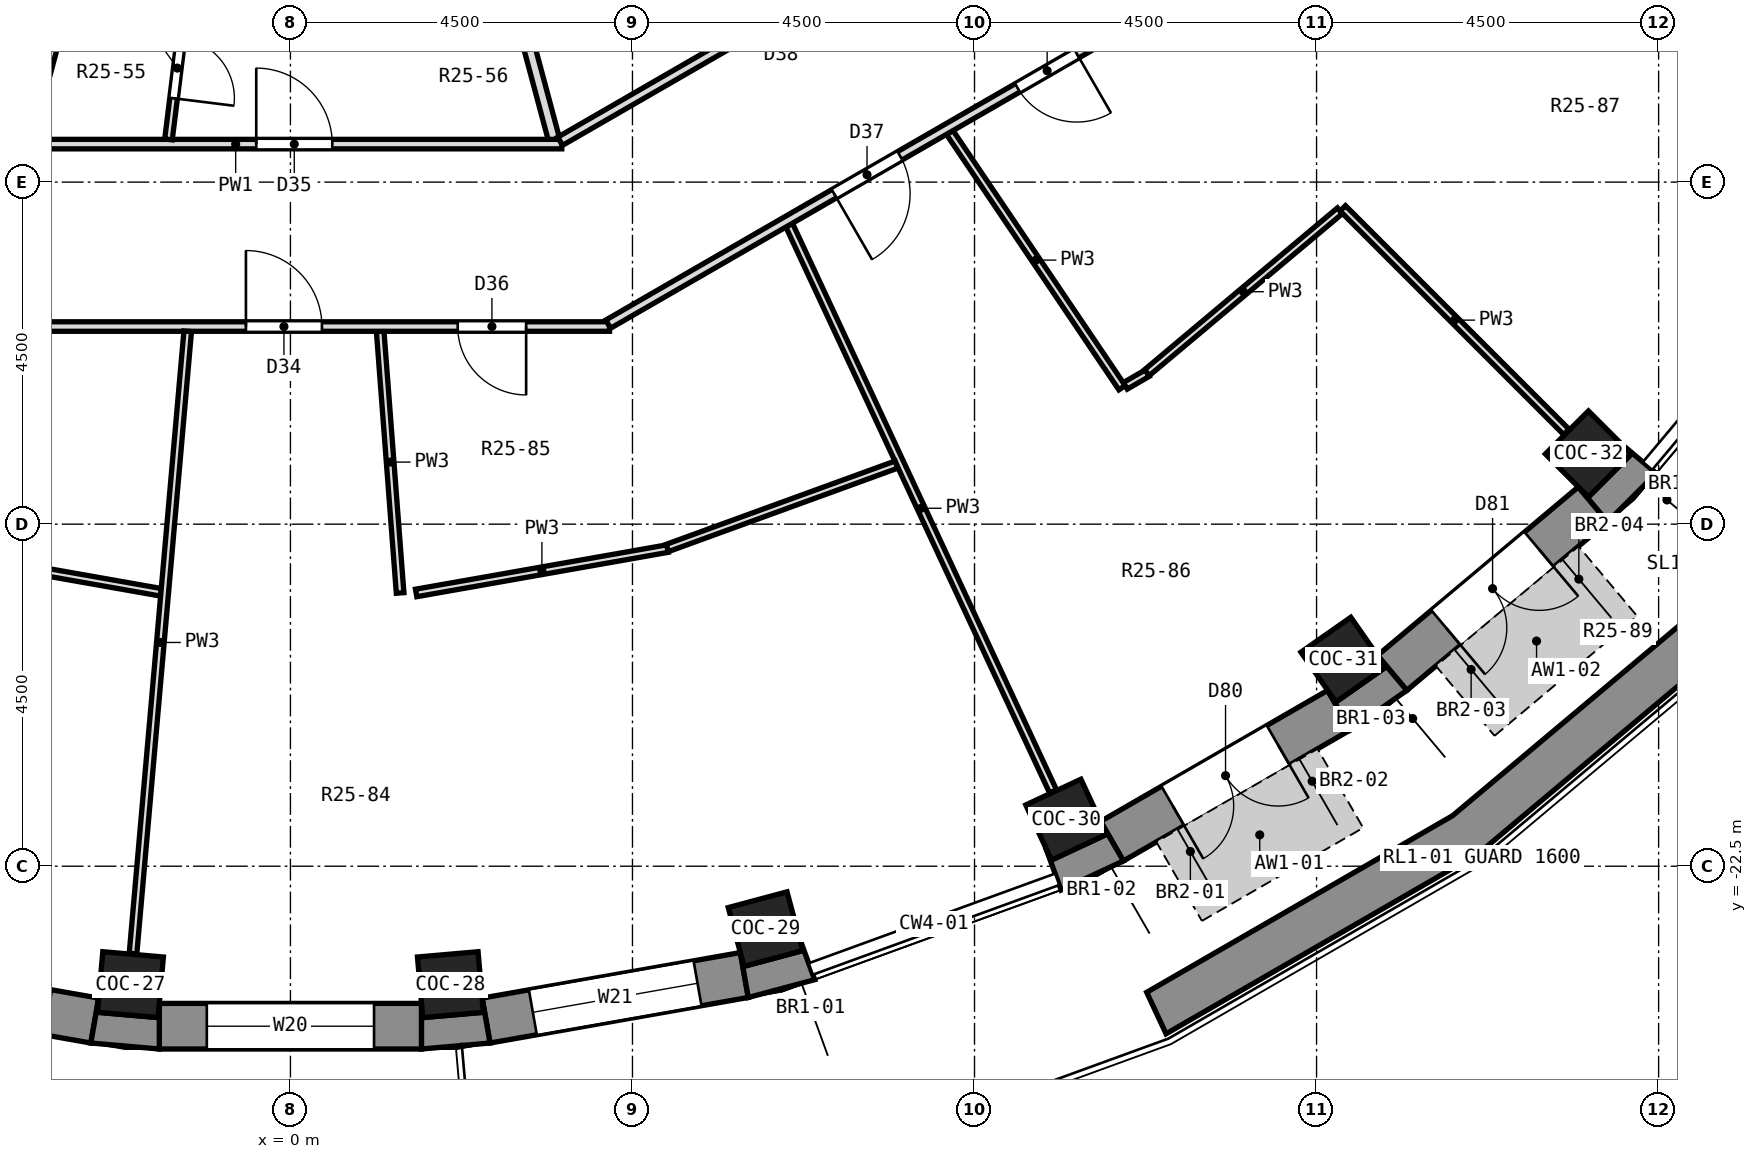
"""IFC4 building model, lengths in metres.
Left out: names, types, materials, properties, quantities, classifications, styles, units other than length and angle.
Written with IfcOpenShell. Run it as: python <this file> out.ifc"""

import sys

from ifc_helpers import new_model, si_unit, direction, frame, frame_2d, origin, origin_2d, place, context, subcontext, project, spatial, polyline, rectangle, outline, extrude, element, fill, save


model = new_model("IFC4")
c1 = context("Model", 3, precision=1e-05, world=origin(), true_north=direction((0.0, 1.0)))
c2 = subcontext(c1, "Body", "Model", "MODEL_VIEW")
j1 = project(units=[si_unit("LENGTHUNIT", "METRE"), si_unit("PLANEANGLEUNIT", "RADIAN")], contexts=[c1])
p1 = place(None, origin())
s1 = spatial("IfcSite", under=j1, at=p1, CompositionType="ELEMENT")
p2 = place(p1, origin())
s2 = spatial("IfcBuilding", under=s1, at=p2, CompositionType="ELEMENT")
p3 = place(p2, frame((0.0, 0.0, 160.8)))
s3 = spatial("IfcBuildingStorey", under=s2, at=p3, CompositionType="ELEMENT", Elevation=160.8)
for number, where, z_axis, x_axis in (
    (1, (-2.105, -24.058, 0.0), (0.0, 0.0, 1.0), (-0.087, -0.996, 0.0)),
    (2, (2.105, -24.058, 0.0), (0.0, 0.0, 1.0), (0.087, -0.996, 0.0)),
    (3, (6.25, -23.327, 0.0), (0.0, 0.0, 1.0), (0.259, -0.966, 0.0)),
    (4, (10.206, -21.887, 0.0), (0.0, 0.0, 1.0), (0.423, -0.906, 0.0)),
    (5, (13.852, -19.782, 0.0), (0.0, 0.0, 1.0), (0.574, -0.819, 0.0)),
    (6, (17.077, -17.077, 0.0), (0.0, 0.0, 1.0), (0.707, -0.707, 0.0)),
):
    element("IfcColumn", number, at=place(p3, frame(where, z_axis=z_axis, x_axis=x_axis)), inside=s3, PredefinedType="COLUMN", context=c2, shape_type="SweptSolid", body=[
        extrude(rectangle(XDim=0.8, YDim=0.8, at=origin_2d()), origin(), (0.0, 0.0, 1.0), 3.3),
    ])
p4 = place(p3, frame((-5.971, -23.932, 0.0), z_axis=(0.0, 0.0, 1.0), x_axis=(0.984814892183, -0.173607684551, 0.0)))
e7 = element("IfcWall", 7, at=p4, inside=s3, PredefinedType="SOLIDWALL", context=c2, shape_type="SweptSolid", body=[
    extrude(rectangle(XDim=3.45, YDim=0.6, at=frame_2d((1.725, 0.0))), origin(), (0.0, 0.0, 1.0), 2.85),
])
p5 = place(p4, frame((0.625, 0.0, 0.9)))
e8 = element("IfcOpeningElement", 8, at=p5, cuts=e7, PredefinedType="OPENING", context=c2, shape_type="SweptSolid", body=[
    extrude(rectangle(XDim=2.2, YDim=1.8, at=frame_2d((1.1, 0.9))), frame((0.0, 0.312, 0.0), z_axis=(0.0, -1.0, 0.0), x_axis=(1.0, 0.0, 0.0)), (0.0, 0.0, 1.0), 0.624),
])
p6 = place(p3, frame((-1.725, -24.605, 0.0), z_axis=(0.0, 0.0, 1.0), x_axis=(1.0, 0.0, 0.0)))
e9 = element("IfcWall", 9, at=p6, inside=s3, PredefinedType="SOLIDWALL", context=c2, shape_type="SweptSolid", body=[
    extrude(rectangle(XDim=3.45, YDim=0.6, at=frame_2d((1.725, 0.0))), origin(), (0.0, 0.0, 1.0), 2.85),
])
p7 = place(p6, frame((0.625, 0.0, 0.9)))
e10 = element("IfcOpeningElement", 10, at=p7, cuts=e9, PredefinedType="OPENING", context=c2, shape_type="SweptSolid", body=[
    extrude(rectangle(XDim=2.2, YDim=1.8, at=frame_2d((1.1, 0.9))), frame((0.0, 0.312, 0.0), z_axis=(0.0, -1.0, 0.0), x_axis=(1.0, 0.0, 0.0)), (0.0, 0.0, 1.0), 0.624),
])
p8 = place(p3, frame((2.574, -24.531, 0.0), z_axis=(0.0, 0.0, 1.0), x_axis=(0.984814892183, 0.173607684551, 0.0)))
e11 = element("IfcWall", 11, at=p8, inside=s3, PredefinedType="SOLIDWALL", context=c2, shape_type="SweptSolid", body=[
    extrude(rectangle(XDim=3.45, YDim=0.6, at=frame_2d((1.725, 0.0))), origin(), (0.0, 0.0, 1.0), 2.85),
])
p9 = place(p8, frame((0.625, 0.0, 0.9)))
e12 = element("IfcOpeningElement", 12, at=p9, cuts=e11, PredefinedType="OPENING", context=c2, shape_type="SweptSolid", body=[
    extrude(rectangle(XDim=2.2, YDim=1.8, at=frame_2d((1.1, 0.9))), frame((0.0, 0.312, 0.0), z_axis=(0.0, -1.0, 0.0), x_axis=(1.0, 0.0, 0.0)), (0.0, 0.0, 1.0), 0.624),
])
p10 = place(p3, frame((10.809, -22.171, 0.0), z_axis=(0.0, 0.0, 1.0), x_axis=(0.86602648383, 0.499998129301, 0.0)))
e13 = element("IfcWall", 13, at=p10, inside=s3, PredefinedType="SOLIDWALL", context=c2, shape_type="SweptSolid", body=[
    extrude(rectangle(XDim=3.45, YDim=0.6, at=frame_2d((1.725, 0.0))), origin(), (0.0, 0.0, 1.0), 2.85),
])
p11 = place(p10, frame((0.925, 0.0, 0.0)))
e14 = element("IfcOpeningElement", 14, at=p11, cuts=e13, PredefinedType="OPENING", context=c2, shape_type="SweptSolid", body=[
    extrude(rectangle(XDim=1.6, YDim=2.4, at=frame_2d((0.8, 1.2))), frame((0.0, 0.312, 0.0), z_axis=(0.0, -1.0, 0.0), x_axis=(1.0, 0.0, 0.0)), (0.0, 0.0, 1.0), 0.624),
])
p12 = place(p3, frame((14.494, -19.957, 0.0), z_axis=(0.0, 0.0, 1.0), x_axis=(0.766058884809, 0.642770398358, 0.0)))
e15 = element("IfcWall", 15, at=p12, inside=s3, PredefinedType="SOLIDWALL", context=c2, shape_type="SweptSolid", body=[
    extrude(rectangle(XDim=3.449, YDim=0.6, at=frame_2d((1.725, 0.0))), origin(), (0.0, 0.0, 1.0), 2.85),
])
p13 = place(p12, frame((0.925, 0.0, 0.0)))
e16 = element("IfcOpeningElement", 16, at=p13, cuts=e15, PredefinedType="OPENING", context=c2, shape_type="SweptSolid", body=[
    extrude(rectangle(XDim=1.6, YDim=2.4, at=frame_2d((0.8, 1.2))), frame((0.0, 0.312, 0.0), z_axis=(0.0, -1.0, 0.0), x_axis=(1.0, 0.0, 0.0)), (0.0, 0.0, 1.0), 0.624),
])
p14 = place(p3, origin())
e17 = element("IfcWall", 17, at=p14, inside=s3, PredefinedType="SOLIDWALL", context=c2, shape_type="SweptSolid", body=[
    extrude(outline(polyline([(-2.626, -24.826), (-1.725, -24.905), (-1.725, -24.305), (-1.741, -24.491), (-2.538, -24.422), (-2.522, -24.235), (-2.626, -24.826)])), origin(), (0.0, 0.0, 1.0), 2.85),
])
p15 = place(p3, origin())
e18 = element("IfcWall", 18, at=p15, inside=s3, PredefinedType="SOLIDWALL", context=c2, shape_type="SweptSolid", body=[
    extrude(outline(polyline([(1.725, -24.905), (2.626, -24.826), (2.522, -24.235), (2.538, -24.422), (1.741, -24.491), (1.725, -24.305), (1.725, -24.905)])), origin(), (0.0, 0.0, 1.0), 2.85),
])
p16 = place(p3, origin())
e19 = element("IfcWall", 19, at=p16, inside=s3, PredefinedType="SOLIDWALL", context=c2, shape_type="SweptSolid", body=[
    extrude(outline(polyline([(6.023, -24.227), (6.897, -23.993), (6.692, -23.429), (6.74, -23.61), (5.968, -23.817), (5.919, -23.636), (6.023, -24.227)])), origin(), (0.0, 0.0, 1.0), 2.85),
])
p17 = place(p3, origin())
e20 = element("IfcWall", 20, at=p17, inside=s3, PredefinedType="SOLIDWALL", context=c2, shape_type="SweptSolid", body=[
    extrude(outline(polyline([(10.959, -22.431), (10.659, -21.911), (10.738, -22.081), (10.013, -22.419), (9.934, -22.249), (10.139, -22.813), (10.959, -22.431)])), origin(), (0.0, 0.0, 1.0), 2.85),
])
p18 = place(p3, origin())
e21 = element("IfcWall", 21, at=p18, inside=s3, PredefinedType="SOLIDWALL", context=c2, shape_type="SweptSolid", body=[
    extrude(outline(polyline([(13.946, -20.706), (14.687, -20.187), (14.302, -19.727), (14.409, -19.881), (13.754, -20.34), (13.646, -20.186), (13.946, -20.706)])), origin(), (0.0, 0.0, 1.0), 2.85),
])
p19 = place(p3, origin())
e22 = element("IfcWall", 22, at=p19, inside=s3, PredefinedType="SOLIDWALL", context=c2, shape_type="SweptSolid", body=[
    extrude(outline(polyline([(17.969, -17.33), (17.51, -16.944), (17.642, -17.077), (17.077, -17.642), (16.944, -17.51), (17.33, -17.969), (17.969, -17.33)])), origin(), (0.0, 0.0, 1.0), 2.85),
])
p20 = place(p3, origin())
e23 = element("IfcWall", 23, at=p20, inside=s3, PredefinedType="PARAPET", context=c2, shape_type="SweptSolid", body=[
    extrude(outline(polyline([(11.52, -24.705), (15.635, -22.329), (19.275, -19.275), (18.849, -18.849), (15.289, -21.836), (11.265, -24.159), (11.52, -24.705)])), origin(), (0.0, 0.0, 1.0), 0.5),
])
p21 = place(p3, frame((1.181, -15.462, 0.0), z_axis=(0.0, 0.0, 1.0), x_axis=(0.07601515228, -0.997106662611, 0.0)))
e24 = element("IfcWall", 24, at=p21, inside=s3, PredefinedType="PARTITIONING", context=c2, shape_type="SweptSolid", body=[
    extrude(rectangle(XDim=3.453, YDim=0.1, at=frame_2d((1.726, 0.0))), origin(), (0.0, 0.0, 1.0), 2.85),
])
p22 = place(p3, frame((2.457, -9.169, 0.0), z_axis=(0.0, 0.0, 1.0), x_axis=(0.258849662474, -0.965917621869, 0.0)))
e25 = element("IfcWall", 25, at=p22, inside=s3, PredefinedType="PARTITIONING", context=c2, shape_type="SweptSolid", body=[
    extrude(rectangle(XDim=3.904, YDim=0.15, at=frame_2d((1.952, 0.0))), origin(), (0.0, 0.0, 1.0), 2.85),
])
p23 = place(p3, frame((6.562, -14.066, 0.0), z_axis=(0.0, 0.0, 1.0), x_axis=(0.422374740617, -0.906421302976, 0.0)))
e26 = element("IfcWall", 26, at=p23, inside=s3, PredefinedType="PARTITIONING", context=c2, shape_type="SweptSolid", body=[
    extrude(rectangle(XDim=8.218, YDim=0.1, at=frame_2d((4.109, 0.0))), origin(), (0.0, 0.0, 1.0), 2.85),
])
p24 = place(p3, frame((8.674, -12.847, 0.0), z_axis=(0.0, 0.0, 1.0), x_axis=(0.559460436722, -0.828857056279, 0.0)))
e27 = element("IfcWall", 27, at=p24, inside=s3, PredefinedType="PARTITIONING", context=c2, shape_type="SweptSolid", body=[
    extrude(rectangle(XDim=4.052, YDim=0.1, at=frame_2d((2.026, 0.0))), origin(), (0.0, 0.0, 1.0), 2.85),
])
p25 = place(p3, frame((13.845, -13.845, 0.0), z_axis=(0.0, 0.0, 1.0), x_axis=(0.707106781187, -0.707106781187, 0.0)))
e28 = element("IfcWall", 28, at=p25, inside=s3, PredefinedType="PARTITIONING", context=c2, shape_type="SweptSolid", body=[
    extrude(rectangle(XDim=4.16, YDim=0.1, at=frame_2d((2.08, 0.0))), origin(), (0.0, 0.0, 1.0), 2.85),
])
p26 = place(p3, frame((-4.863, -18.339, 0.0), z_axis=(0.0, 0.0, 1.0), x_axis=(0.984782026727, -0.173794015534, 0.0)))
e29 = element("IfcWall", 29, at=p26, inside=s3, PredefinedType="PARTITIONING", context=c2, shape_type="SweptSolid", body=[
    extrude(rectangle(XDim=3.208, YDim=0.1, at=frame_2d((1.604, 0.0))), origin(), (0.0, 0.0, 1.0), 2.85),
])
p27 = place(p3, frame((-4.063, -15.4, 0.0), z_axis=(0.0, 0.0, 1.0), x_axis=(1.0, 0.0, 0.0)))
e30 = element("IfcWall", 30, at=p27, inside=s3, PredefinedType="PARTITIONING", context=c2, shape_type="SweptSolid", body=[
    extrude(rectangle(XDim=8.262, YDim=0.125, at=frame_2d((4.131, 0.0))), origin(), (0.0, 0.0, 1.0), 2.85),
])
p28 = place(p27, frame((3.478, 0.0, 0.0)))
e31 = element("IfcOpeningElement", 31, at=p28, cuts=e30, PredefinedType="OPENING", context=c2, shape_type="SweptSolid", body=[
    extrude(rectangle(XDim=1.0, YDim=2.1, at=frame_2d((0.5, 1.05))), frame((0.0, 0.074, 0.0), z_axis=(0.0, -1.0, 0.0), x_axis=(1.0, 0.0, 0.0)), (0.0, 0.0, 1.0), 0.149),
])
p29 = place(p27, frame((6.264, 0.0, 0.0)))
e32 = element("IfcOpeningElement", 32, at=p29, cuts=e30, PredefinedType="OPENING", context=c2, shape_type="SweptSolid", body=[
    extrude(rectangle(XDim=0.9, YDim=2.1, at=frame_2d((0.45, 1.05))), frame((0.0, 0.074, 0.0), z_axis=(0.0, -1.0, 0.0), x_axis=(1.0, 0.0, 0.0)), (0.0, 0.0, 1.0), 0.149),
])
p30 = place(p3, frame((-3.42, -13.0, 0.0), z_axis=(0.0, 0.0, 1.0), x_axis=(1.0, 0.0, 0.0)))
e33 = element("IfcWall", 33, at=p30, inside=s3, PredefinedType="PARTITIONING", context=c2, shape_type="SweptSolid", body=[
    extrude(rectangle(XDim=6.99, YDim=0.125, at=frame_2d((3.495, 0.0))), origin(), (0.0, 0.0, 1.0), 2.85),
])
p31 = place(p30, frame((2.971, 0.0, 0.0)))
e34 = element("IfcOpeningElement", 34, at=p31, cuts=e33, PredefinedType="OPENING", context=c2, shape_type="SweptSolid", body=[
    extrude(rectangle(XDim=1.0, YDim=2.1, at=frame_2d((0.5, 1.05))), frame((0.0, 0.074, 0.0), z_axis=(0.0, -1.0, 0.0), x_axis=(1.0, 0.0, 0.0)), (0.0, 0.0, 1.0), 0.149),
])
p32 = place(p3, frame((1.654, -18.905, 0.0), z_axis=(0.0, 0.0, 1.0), x_axis=(0.984783558818, 0.173785333909, 0.0)))
e35 = element("IfcWall", 35, at=p32, inside=s3, PredefinedType="PARTITIONING", context=c2, shape_type="SweptSolid", body=[
    extrude(rectangle(XDim=3.359, YDim=0.1, at=frame_2d((1.679, 0.0))), origin(), (0.0, 0.0, 1.0), 2.85),
])
p33 = place(p3, frame((4.959, -18.313, 0.0), z_axis=(0.0, 0.0, 1.0), x_axis=(0.939697820391, 0.34200585719, 0.0)))
e36 = element("IfcWall", 36, at=p33, inside=s3, PredefinedType="PARTITIONING", context=c2, shape_type="SweptSolid", body=[
    extrude(rectangle(XDim=3.207, YDim=0.1, at=frame_2d((1.604, 0.0))), origin(), (0.0, 0.0, 1.0), 2.85),
])
p34 = place(p3, frame((10.984, -16.18, 0.0), z_axis=(0.0, 0.0, 1.0), x_axis=(0.865942374699, 0.500143783026, 0.0)))
e37 = element("IfcWall", 37, at=p34, inside=s3, PredefinedType="PARTITIONING", context=c2, shape_type="SweptSolid", body=[
    extrude(rectangle(XDim=0.334, YDim=0.1, at=frame_2d((0.167, 0.0))), origin(), (0.0, 0.0, 1.0), 2.85),
])
p35 = place(p3, frame((4.18, -15.369, 0.0), z_axis=(0.0, 0.0, 1.0), x_axis=(0.86608029966, 0.499904905498, 0.0)))
e38 = element("IfcWall", 38, at=p35, inside=s3, PredefinedType="PARTITIONING", context=c2, shape_type="SweptSolid", body=[
    extrude(rectangle(XDim=8.263, YDim=0.125, at=frame_2d((4.131, 0.0))), origin(), (0.0, 0.0, 1.0), 2.85),
])
p36 = place(p35, frame((3.432, 0.0, 0.0)))
e39 = element("IfcOpeningElement", 39, at=p36, cuts=e38, PredefinedType="OPENING", context=c2, shape_type="SweptSolid", body=[
    extrude(rectangle(XDim=1.0, YDim=2.1, at=frame_2d((0.5, 1.05))), frame((0.0, 0.074, 0.0), z_axis=(0.0, -1.0, 0.0), x_axis=(1.0, 0.0, 0.0)), (0.0, 0.0, 1.0), 0.149),
])
p37 = place(p35, frame((6.219, 0.0, 0.0)))
e40 = element("IfcOpeningElement", 40, at=p37, cuts=e38, PredefinedType="OPENING", context=c2, shape_type="SweptSolid", body=[
    extrude(rectangle(XDim=0.9, YDim=2.1, at=frame_2d((0.45, 1.05))), frame((0.0, 0.074, 0.0), z_axis=(0.0, -1.0, 0.0), x_axis=(1.0, 0.0, 0.0)), (0.0, 0.0, 1.0), 0.149),
])
p38 = place(p3, frame((3.548, -12.962, 0.0), z_axis=(0.0, 0.0, 1.0), x_axis=(0.866078638394, 0.499907783615, 0.0)))
e41 = element("IfcWall", 41, at=p38, inside=s3, PredefinedType="PARTITIONING", context=c2, shape_type="SweptSolid", body=[
    extrude(rectangle(XDim=6.842, YDim=0.125, at=frame_2d((3.421, 0.0))), origin(), (0.0, 0.0, 1.0), 2.85),
])
p39 = place(p38, frame((2.858, 0.0, 0.0)))
e42 = element("IfcOpeningElement", 42, at=p39, cuts=e41, PredefinedType="OPENING", context=c2, shape_type="SweptSolid", body=[
    extrude(rectangle(XDim=1.0, YDim=2.1, at=frame_2d((0.5, 1.05))), frame((0.0, 0.074, 0.0), z_axis=(0.0, -1.0, 0.0), x_axis=(1.0, 0.0, 0.0)), (0.0, 0.0, 1.0), 0.149),
])
p40 = place(p3, frame((11.269, -16.006, 0.0), z_axis=(0.0, 0.0, 1.0), x_axis=(0.766157600424, 0.642652729951, 0.0)))
e43 = element("IfcWall", 43, at=p40, inside=s3, PredefinedType="PARTITIONING", context=c2, shape_type="SweptSolid", body=[
    extrude(rectangle(XDim=3.313, YDim=0.1, at=frame_2d((1.656, 0.0))), origin(), (0.0, 0.0, 1.0), 2.85),
])
p41 = place(p3, frame((-3.467, -12.94, 0.0), z_axis=(0.0, 0.0, 1.0), x_axis=(0.258732959093, 0.965948888854, 0.0)))
e44 = element("IfcWall", 44, at=p41, inside=s3, PredefinedType="PARTITIONING", context=c2, shape_type="SweptSolid", body=[
    extrude(rectangle(XDim=3.904, YDim=0.15, at=frame_2d((1.952, 0.0))), origin(), (0.0, 0.0, 1.0), 2.85),
])
p42 = place(p3, frame((-1.604, -12.938, 0.0), z_axis=(0.0, 0.0, 1.0), x_axis=(0.123039852559, 0.992401730491, 0.0)))
e45 = element("IfcWall", 45, at=p42, inside=s3, PredefinedType="PARTITIONING", context=c2, shape_type="SweptSolid", body=[
    extrude(rectangle(XDim=1.903, YDim=0.1, at=frame_2d((0.951, 0.0))), origin(), (0.0, 0.0, 1.0), 2.85),
])
p43 = place(p42, frame((0.545, 0.0, 0.0)))
e46 = element("IfcOpeningElement", 46, at=p43, cuts=e45, PredefinedType="OPENING", context=c2, shape_type="SweptSolid", body=[
    extrude(rectangle(XDim=0.8, YDim=2.1, at=frame_2d((0.4, 1.05))), frame((0.0, 0.062, 0.0), z_axis=(0.0, -1.0, 0.0), x_axis=(1.0, 0.0, 0.0)), (0.0, 0.0, 1.0), 0.124),
])
p44 = place(p3, frame((-2.071, -23.649, 0.0), z_axis=(0.0, 0.0, 1.0), x_axis=(0.087543554658, 0.996160692879, 0.0)))
e47 = element("IfcWall", 47, at=p44, inside=s3, PredefinedType="PARTITIONING", context=c2, shape_type="SweptSolid", body=[
    extrude(rectangle(XDim=8.219, YDim=0.1, at=frame_2d((4.109, 0.0))), origin(), (0.0, 0.0, 1.0), 2.85),
])
p45 = place(p7, origin())
e48 = element("IfcWindow", 48, at=p45, inside=s3, PartitioningType="SINGLE_PANEL", PredefinedType="WINDOW", context=c2, shape_type="SweptSolid", body=[
    extrude(rectangle(XDim=2.2, YDim=1.8, at=frame_2d((1.1, 0.9))), frame((0.0, 0.18, 0.0), z_axis=(0.0, -1.0, 0.0), x_axis=(1.0, 0.0, 0.0)), (0.0, 0.0, 1.0), 0.06),
])
fill(e10, e48)
p46 = place(p9, origin())
e49 = element("IfcWindow", 49, at=p46, inside=s3, PartitioningType="SINGLE_PANEL", PredefinedType="WINDOW", context=c2, shape_type="SweptSolid", body=[
    extrude(rectangle(XDim=2.2, YDim=1.8, at=frame_2d((1.1, 0.9))), frame((0.0, 0.18, 0.0), z_axis=(0.0, -1.0, 0.0), x_axis=(1.0, 0.0, 0.0)), (0.0, 0.0, 1.0), 0.06),
])
fill(e12, e49)
p47 = place(p11, frame((1.6, 0.0, 0.0), z_axis=(0.0, 0.0, 1.0), x_axis=(-1.0, 0.0, 0.0)))
e50 = element("IfcDoor", 50, at=p47, inside=s3, OperationType="DOUBLE_DOOR_SINGLE_SWING", PredefinedType="DOOR", context=c2, shape_type="SweptSolid", body=[
    extrude(rectangle(XDim=1.6, YDim=2.4, at=frame_2d((0.8, 1.2))), frame((0.0, -0.075, 0.0), z_axis=(0.0, -1.0, 0.0), x_axis=(1.0, 0.0, 0.0)), (0.0, 0.0, 1.0), 0.05),
])
fill(e14, e50)
p48 = place(p13, frame((1.6, 0.0, 0.0), z_axis=(0.0, 0.0, 1.0), x_axis=(-1.0, 0.0, 0.0)))
e51 = element("IfcDoor", 51, at=p48, inside=s3, OperationType="DOUBLE_DOOR_SINGLE_SWING", PredefinedType="DOOR", context=c2, shape_type="SweptSolid", body=[
    extrude(rectangle(XDim=1.6, YDim=2.4, at=frame_2d((0.8, 1.2))), frame((0.0, -0.075, 0.0), z_axis=(0.0, -1.0, 0.0), x_axis=(1.0, 0.0, 0.0)), (0.0, 0.0, 1.0), 0.05),
])
fill(e16, e51)
p49 = place(p43, frame((0.8, 0.0, 0.0), z_axis=(0.0, 0.0, 1.0), x_axis=(-1.0, 0.0, 0.0)))
e52 = element("IfcDoor", 52, at=p49, inside=s3, OperationType="SINGLE_SWING_RIGHT", PredefinedType="DOOR", context=c2, shape_type="SweptSolid", body=[
    extrude(rectangle(XDim=0.8, YDim=2.1, at=frame_2d((0.4, 1.05))), frame((0.0, 0.025, 0.0), z_axis=(0.0, -1.0, 0.0), x_axis=(1.0, 0.0, 0.0)), (0.0, 0.0, 1.0), 0.05),
])
fill(e46, e52)
p50 = place(p28, origin())
e53 = element("IfcDoor", 53, at=p50, inside=s3, OperationType="SINGLE_SWING_LEFT", PredefinedType="DOOR", context=c2, shape_type="SweptSolid", body=[
    extrude(rectangle(XDim=1.0, YDim=2.1, at=frame_2d((0.5, 1.05))), frame((0.0, 0.025, 0.0), z_axis=(0.0, -1.0, 0.0), x_axis=(1.0, 0.0, 0.0)), (0.0, 0.0, 1.0), 0.05),
])
fill(e31, e53)
p51 = place(p31, origin())
e54 = element("IfcDoor", 54, at=p51, inside=s3, OperationType="SINGLE_SWING_LEFT", PredefinedType="DOOR", context=c2, shape_type="SweptSolid", body=[
    extrude(rectangle(XDim=1.0, YDim=2.1, at=frame_2d((0.5, 1.05))), frame((0.0, 0.025, 0.0), z_axis=(0.0, -1.0, 0.0), x_axis=(1.0, 0.0, 0.0)), (0.0, 0.0, 1.0), 0.05),
])
fill(e34, e54)
p52 = place(p29, frame((0.9, 0.0, 0.0), z_axis=(0.0, 0.0, 1.0), x_axis=(-1.0, 0.0, 0.0)))
e55 = element("IfcDoor", 55, at=p52, inside=s3, OperationType="SINGLE_SWING_LEFT", PredefinedType="DOOR", context=c2, shape_type="SweptSolid", body=[
    extrude(rectangle(XDim=0.9, YDim=2.1, at=frame_2d((0.45, 1.05))), frame((0.0, 0.025, 0.0), z_axis=(0.0, -1.0, 0.0), x_axis=(1.0, 0.0, 0.0)), (0.0, 0.0, 1.0), 0.05),
])
fill(e32, e55)
p53 = place(p36, frame((1.0, 0.0, 0.0), z_axis=(0.0, 0.0, 1.0), x_axis=(-1.0, 0.0, 0.0)))
e56 = element("IfcDoor", 56, at=p53, inside=s3, OperationType="SINGLE_SWING_RIGHT", PredefinedType="DOOR", context=c2, shape_type="SweptSolid", body=[
    extrude(rectangle(XDim=1.0, YDim=2.1, at=frame_2d((0.5, 1.05))), frame((0.0, 0.025, 0.0), z_axis=(0.0, -1.0, 0.0), x_axis=(1.0, 0.0, 0.0)), (0.0, 0.0, 1.0), 0.05),
])
fill(e39, e56)
p54 = place(p37, frame((0.9, 0.0, 0.0), z_axis=(0.0, 0.0, 1.0), x_axis=(-1.0, 0.0, 0.0)))
e57 = element("IfcDoor", 57, at=p54, inside=s3, OperationType="SINGLE_SWING_LEFT", PredefinedType="DOOR", context=c2, shape_type="SweptSolid", body=[
    extrude(rectangle(XDim=0.9, YDim=2.1, at=frame_2d((0.45, 1.05))), frame((0.0, 0.025, 0.0), z_axis=(0.0, -1.0, 0.0), x_axis=(1.0, 0.0, 0.0)), (0.0, 0.0, 1.0), 0.05),
])
fill(e40, e57)
save(model, sys.argv[1])
